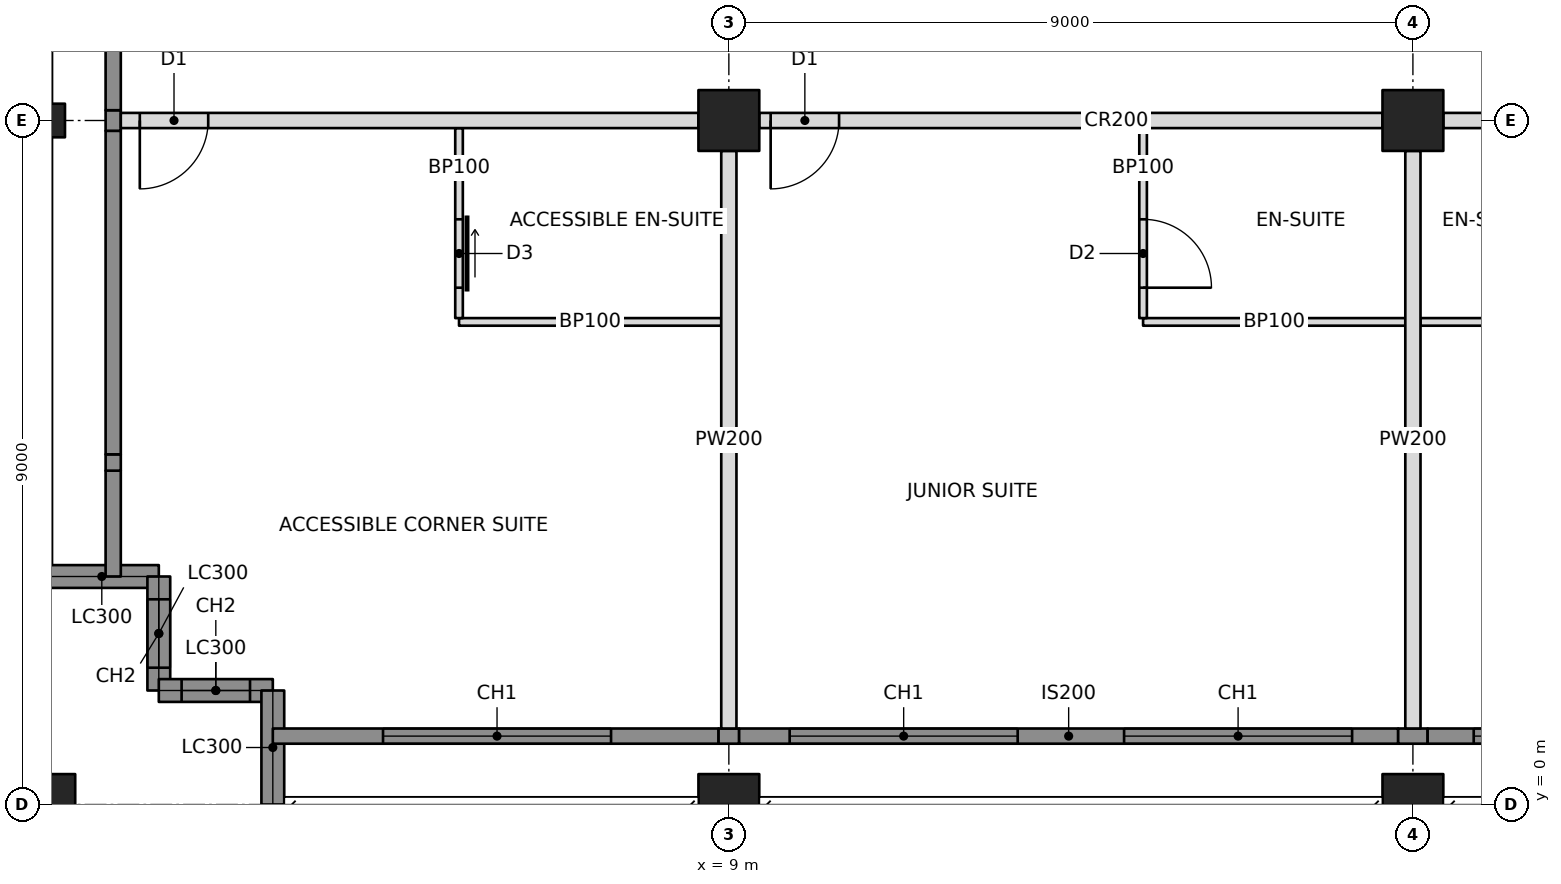
"""IFC4 building model, lengths in metres.
Left out: names, types, materials, properties, quantities, classifications, styles, units other than length and angle.
Written with IfcOpenShell. Run it as: python <this file> out.ifc"""

import sys

from ifc_helpers import new_model, si_unit, direction, frame, frame_2d, origin, origin_with_axes, origin_2d, place, context, subcontext, project, spatial, rectangle, hollow_rectangle, i_section, extrude, element, fill, save


model = new_model("IFC4")
c1 = context("Model", 3, precision=1e-05, world=origin(), true_north=direction((0.0, 1.0)))
c2 = subcontext(c1, "Body", "Model", "MODEL_VIEW")
j1 = project(units=[si_unit("LENGTHUNIT", "METRE"), si_unit("PLANEANGLEUNIT", "RADIAN")], contexts=[c1])
p1 = place(None, origin())
s1 = spatial("IfcSite", under=j1, at=p1, CompositionType="ELEMENT")
p2 = place(p1, origin())
s2 = spatial("IfcBuilding", under=s1, at=p2, CompositionType="ELEMENT")
p3 = place(p2, frame((0.0, 0.0, 148.6)))
s3 = spatial("IfcBuildingStorey", under=s2, at=p3, CompositionType="ELEMENT", Elevation=148.6)
p4 = place(p3, origin_with_axes())
e1 = element("IfcColumn", 1, at=p4, inside=s3, PredefinedType="COLUMN", context=c2, shape_type="SweptSolid", body=[
    extrude(hollow_rectangle(XDim=0.8, YDim=0.8, WallThickness=0.06, at=origin_2d()), origin(), (0.0, 0.0, 1.0), 3.4),
])
p5 = place(p3, frame((0.0, 9.0, 0.0), z_axis=(0.0, 0.0, 1.0), x_axis=(0.0, 1.0, 0.0)))
e2 = element("IfcColumn", 2, at=p5, inside=s3, PredefinedType="COLUMN", context=c2, shape_type="SweptSolid", body=[
    extrude(i_section(OverallWidth=0.442, OverallDepth=0.531, WebThickness=0.066, FlangeThickness=0.106, at=origin_2d()), origin(), (0.0, 0.0, 1.0), 3.4),
])
p6 = place(p3, frame((9.0, 0.0, 0.0), z_axis=(0.0, 0.0, 1.0), x_axis=(1.0, 0.0, 0.0)))
e3 = element("IfcColumn", 3, at=p6, inside=s3, PredefinedType="COLUMN", context=c2, shape_type="SweptSolid", body=[
    extrude(hollow_rectangle(XDim=0.8, YDim=0.8, WallThickness=0.06, at=origin_2d()), origin(), (0.0, 0.0, 1.0), 3.4),
])
p7 = place(p3, frame((9.0, 9.0, 0.0), z_axis=(0.0, 0.0, 1.0), x_axis=(1.0, 0.0, 0.0)))
e4 = element("IfcColumn", 4, at=p7, inside=s3, PredefinedType="COLUMN", context=c2, shape_type="SweptSolid", body=[
    extrude(hollow_rectangle(XDim=0.8, YDim=0.8, WallThickness=0.07, at=origin_2d()), origin(), (0.0, 0.0, 1.0), 3.4),
])
p8 = place(p3, frame((18.0, 0.0, 0.0), z_axis=(0.0, 0.0, 1.0), x_axis=(1.0, 0.0, 0.0)))
e5 = element("IfcColumn", 5, at=p8, inside=s3, PredefinedType="COLUMN", context=c2, shape_type="SweptSolid", body=[
    extrude(hollow_rectangle(XDim=0.8, YDim=0.8, WallThickness=0.06, at=origin_2d()), origin(), (0.0, 0.0, 1.0), 3.4),
])
p9 = place(p3, frame((18.0, 9.0, 0.0), z_axis=(0.0, 0.0, 1.0), x_axis=(1.0, 0.0, 0.0)))
e6 = element("IfcColumn", 6, at=p9, inside=s3, PredefinedType="COLUMN", context=c2, shape_type="SweptSolid", body=[
    extrude(hollow_rectangle(XDim=0.8, YDim=0.8, WallThickness=0.07, at=origin_2d()), origin(), (0.0, 0.0, 1.0), 3.4),
])
p10 = place(p3, frame((0.0, 3.0, 0.0), z_axis=(0.0, 0.0, 1.0), x_axis=(1.0, 0.0, 0.0)))
e7 = element("IfcWall", 7, at=p10, inside=s3, PredefinedType="SOLIDWALL", context=c2, shape_type="SweptSolid", body=[
    extrude(rectangle(XDim=1.5, YDim=0.3, at=frame_2d((0.75, 0.0))), origin(), (0.0, 0.0, 1.0), 2.42),
])
p11 = place(p3, frame((1.5, 3.0, 0.0), z_axis=(0.0, 0.0, 1.0), x_axis=(0.0, -1.0, 0.0)))
e8 = element("IfcWall", 8, at=p11, inside=s3, PredefinedType="SOLIDWALL", context=c2, shape_type="SweptSolid", body=[
    extrude(rectangle(XDim=1.5, YDim=0.3, at=frame_2d((0.75, 0.0))), origin(), (0.0, 0.0, 1.0), 3.2),
])
p12 = place(p11, frame((0.3, 0.0, 0.6)))
e9 = element("IfcOpeningElement", 9, at=p12, cuts=e8, PredefinedType="OPENING", context=c2, shape_type="SweptSolid", body=[
    extrude(rectangle(XDim=0.9, YDim=2.2, at=frame_2d((0.45, 1.1))), frame((0.0, 0.16, 0.0), z_axis=(0.0, -1.0, 0.0), x_axis=(1.0, 0.0, 0.0)), (0.0, 0.0, 1.0), 0.32),
])
p13 = place(p3, frame((1.5, 1.5, 0.0), z_axis=(0.0, 0.0, 1.0), x_axis=(1.0, 0.0, 0.0)))
e10 = element("IfcWall", 10, at=p13, inside=s3, PredefinedType="SOLIDWALL", context=c2, shape_type="SweptSolid", body=[
    extrude(rectangle(XDim=1.5, YDim=0.3, at=frame_2d((0.75, 0.0))), origin(), (0.0, 0.0, 1.0), 3.2),
])
p14 = place(p13, frame((0.3, 0.0, 0.6)))
e11 = element("IfcOpeningElement", 11, at=p14, cuts=e10, PredefinedType="OPENING", context=c2, shape_type="SweptSolid", body=[
    extrude(rectangle(XDim=0.9, YDim=2.2, at=frame_2d((0.45, 1.1))), frame((0.0, 0.16, 0.0), z_axis=(0.0, -1.0, 0.0), x_axis=(1.0, 0.0, 0.0)), (0.0, 0.0, 1.0), 0.32),
])
p15 = place(p3, frame((3.0, 1.5, 0.0), z_axis=(0.0, 0.0, 1.0), x_axis=(0.0, -1.0, 0.0)))
e12 = element("IfcWall", 12, at=p15, inside=s3, PredefinedType="SOLIDWALL", context=c2, shape_type="SweptSolid", body=[
    extrude(rectangle(XDim=1.5, YDim=0.3, at=frame_2d((0.75, 0.0))), origin(), (0.0, 0.0, 1.0), 2.42),
])
p16 = place(p3, frame((3.0, 0.9, 0.0), z_axis=(0.0, 0.0, 1.0), x_axis=(1.0, 0.0, 0.0)))
e13 = element("IfcWall", 13, at=p16, inside=s3, PredefinedType="SOLIDWALL", context=c2, shape_type="SweptSolid", body=[
    extrude(rectangle(XDim=5.865, YDim=0.2, at=frame_2d((2.932, 0.0))), origin(), (0.0, 0.0, 1.0), 3.2),
])
p17 = place(p16, frame((1.45, 0.0, 0.6)))
e14 = element("IfcOpeningElement", 14, at=p17, cuts=e13, PredefinedType="OPENING", context=c2, shape_type="SweptSolid", body=[
    extrude(rectangle(XDim=3.0, YDim=2.2, at=frame_2d((1.5, 1.1))), frame((0.0, 0.11, 0.0), z_axis=(0.0, -1.0, 0.0), x_axis=(1.0, 0.0, 0.0)), (0.0, 0.0, 1.0), 0.22),
])
p18 = place(p3, frame((0.9, 3.0, 0.0), z_axis=(0.0, 0.0, 1.0), x_axis=(0.0, 1.0, 0.0)))
e15 = element("IfcWall", 15, at=p18, inside=s3, PredefinedType="SOLIDWALL", context=c2, shape_type="SweptSolid", body=[
    extrude(rectangle(XDim=1.393, YDim=0.2, at=frame_2d((0.696, 0.0))), origin(), (0.0, 0.0, 1.0), 3.2),
])
p19 = place(p3, frame((1.0, 9.0, 0.0), z_axis=(0.0, 0.0, 1.0), x_axis=(1.0, 0.0, 0.0)))
e16 = element("IfcWall", 16, at=p19, inside=s3, PredefinedType="PARTITIONING", context=c2, shape_type="SweptSolid", body=[
    extrude(rectangle(XDim=7.6, YDim=0.2, at=frame_2d((3.8, 0.0))), origin(), (0.0, 0.0, 1.0), 2.438),
])
p20 = place(p19, frame((0.25, 0.0, 0.0)))
e17 = element("IfcOpeningElement", 17, at=p20, cuts=e16, PredefinedType="OPENING", context=c2, shape_type="SweptSolid", body=[
    extrude(rectangle(XDim=0.9, YDim=2.1, at=frame_2d((0.45, 1.05))), frame((0.0, 0.11, 0.0), z_axis=(0.0, -1.0, 0.0), x_axis=(1.0, 0.0, 0.0)), (0.0, 0.0, 1.0), 0.22),
])
p21 = place(p3, frame((9.4, 9.0, 0.0), z_axis=(0.0, 0.0, 1.0), x_axis=(1.0, 0.0, 0.0)))
e18 = element("IfcWall", 18, at=p21, inside=s3, PredefinedType="PARTITIONING", context=c2, shape_type="SweptSolid", body=[
    extrude(rectangle(XDim=8.2, YDim=0.2, at=frame_2d((4.1, 0.0))), origin(), (0.0, 0.0, 1.0), 2.405),
])
p22 = place(p21, frame((0.15, 0.0, 0.0)))
e19 = element("IfcOpeningElement", 19, at=p22, cuts=e18, PredefinedType="OPENING", context=c2, shape_type="SweptSolid", body=[
    extrude(rectangle(XDim=0.9, YDim=2.1, at=frame_2d((0.45, 1.05))), frame((0.0, 0.11, 0.0), z_axis=(0.0, -1.0, 0.0), x_axis=(1.0, 0.0, 0.0)), (0.0, 0.0, 1.0), 0.22),
])
p23 = place(p3, frame((18.4, 9.0, 0.0), z_axis=(0.0, 0.0, 1.0), x_axis=(1.0, 0.0, 0.0)))
e20 = element("IfcWall", 20, at=p23, inside=s3, PredefinedType="PARTITIONING", context=c2, shape_type="SweptSolid", body=[
    extrude(rectangle(XDim=8.2, YDim=0.2, at=frame_2d((4.1, 0.0))), origin(), (0.0, 0.0, 1.0), 2.405),
])
p24 = place(p23, frame((2.95, 0.0, 0.0)))
e21 = element("IfcOpeningElement", 21, at=p24, cuts=e20, PredefinedType="OPENING", context=c2, shape_type="SweptSolid", body=[
    extrude(rectangle(XDim=0.9, YDim=2.1, at=frame_2d((0.45, 1.05))), frame((0.0, 0.11, 0.0), z_axis=(0.0, -1.0, 0.0), x_axis=(1.0, 0.0, 0.0)), (0.0, 0.0, 1.0), 0.22),
])
p25 = place(p23, frame((4.35, 0.0, 0.0)))
e22 = element("IfcOpeningElement", 22, at=p25, cuts=e20, PredefinedType="OPENING", context=c2, shape_type="SweptSolid", body=[
    extrude(rectangle(XDim=0.9, YDim=2.1, at=frame_2d((0.45, 1.05))), frame((0.0, 0.11, 0.0), z_axis=(0.0, -1.0, 0.0), x_axis=(1.0, 0.0, 0.0)), (0.0, 0.0, 1.0), 0.22),
])
p26 = place(p3, frame((9.0, 8.6, 0.0), z_axis=(0.0, 0.0, 1.0), x_axis=(0.0, -1.0, 0.0)))
e23 = element("IfcWall", 23, at=p26, inside=s3, PredefinedType="PARTITIONING", context=c2, shape_type="SweptSolid", body=[
    extrude(rectangle(XDim=7.6, YDim=0.2, at=frame_2d((3.8, 0.0))), origin(), (0.0, 0.0, 1.0), 2.438),
])
p27 = place(p3, frame((18.0, 8.6, 0.0), z_axis=(0.0, 0.0, 1.0), x_axis=(0.0, -1.0, 0.0)))
e24 = element("IfcWall", 24, at=p27, inside=s3, PredefinedType="PARTITIONING", context=c2, shape_type="SweptSolid", body=[
    extrude(rectangle(XDim=7.6, YDim=0.2, at=frame_2d((3.8, 0.0))), origin(), (0.0, 0.0, 1.0), 2.405),
])
p28 = place(p3, frame((5.45, 6.35, 0.0), z_axis=(0.0, 0.0, 1.0), x_axis=(1.0, 0.0, 0.0)))
e25 = element("IfcWall", 25, at=p28, inside=s3, PredefinedType="PARTITIONING", context=c2, shape_type="SweptSolid", body=[
    extrude(rectangle(XDim=3.45, YDim=0.1, at=frame_2d((1.725, 0.0))), origin(), (0.0, 0.0, 1.0), 2.438),
])
p29 = place(p3, frame((5.45, 8.9, 0.0), z_axis=(0.0, 0.0, 1.0), x_axis=(0.0, -1.0, 0.0)))
e26 = element("IfcWall", 26, at=p29, inside=s3, PredefinedType="PARTITIONING", context=c2, shape_type="SweptSolid", body=[
    extrude(rectangle(XDim=2.5, YDim=0.1, at=frame_2d((1.25, 0.0))), origin(), (0.0, 0.0, 1.0), 2.438),
])
p30 = place(p29, frame((1.2, 0.0, 0.0)))
e27 = element("IfcOpeningElement", 27, at=p30, cuts=e26, PredefinedType="OPENING", context=c2, shape_type="SweptSolid", body=[
    extrude(rectangle(XDim=0.9, YDim=2.1, at=frame_2d((0.45, 1.05))), frame((0.0, 0.06, 0.0), z_axis=(0.0, -1.0, 0.0), x_axis=(1.0, 0.0, 0.0)), (0.0, 0.0, 1.0), 0.12),
])
p31 = place(p3, frame((14.45, 6.35, 0.0), z_axis=(0.0, 0.0, 1.0), x_axis=(1.0, 0.0, 0.0)))
e28 = element("IfcWall", 28, at=p31, inside=s3, PredefinedType="PARTITIONING", context=c2, shape_type="SweptSolid", body=[
    extrude(rectangle(XDim=3.45, YDim=0.1, at=frame_2d((1.725, 0.0))), origin(), (0.0, 0.0, 1.0), 2.404),
])
p32 = place(p3, frame((14.45, 8.9, 0.0), z_axis=(0.0, 0.0, 1.0), x_axis=(0.0, -1.0, 0.0)))
e29 = element("IfcWall", 29, at=p32, inside=s3, PredefinedType="PARTITIONING", context=c2, shape_type="SweptSolid", body=[
    extrude(rectangle(XDim=2.5, YDim=0.1, at=frame_2d((1.25, 0.0))), origin(), (0.0, 0.0, 1.0), 2.404),
])
p33 = place(p32, frame((1.2, 0.0, 0.0)))
e30 = element("IfcOpeningElement", 30, at=p33, cuts=e29, PredefinedType="OPENING", context=c2, shape_type="SweptSolid", body=[
    extrude(rectangle(XDim=0.9, YDim=2.1, at=frame_2d((0.45, 1.05))), frame((0.0, 0.06, 0.0), z_axis=(0.0, -1.0, 0.0), x_axis=(1.0, 0.0, 0.0)), (0.0, 0.0, 1.0), 0.12),
])
p34 = place(p3, frame((18.1, 6.35, 0.0), z_axis=(0.0, 0.0, 1.0), x_axis=(1.0, 0.0, 0.0)))
e31 = element("IfcWall", 31, at=p34, inside=s3, PredefinedType="PARTITIONING", context=c2, shape_type="SweptSolid", body=[
    extrude(rectangle(XDim=2.95, YDim=0.1, at=frame_2d((1.475, 0.0))), origin(), (0.0, 0.0, 1.0), 2.404),
])
p35 = place(p3, frame((8.865, 0.9, 0.0), z_axis=(0.0, 0.0, 1.0), x_axis=(1.0, 0.0, 0.0)))
e32 = element("IfcWall", 32, at=p35, inside=s3, PredefinedType="SOLIDWALL", context=c2, shape_type="SweptSolid", body=[
    extrude(rectangle(XDim=0.271, YDim=0.2, at=frame_2d((0.135, 0.0))), origin(), (0.0, 0.0, 1.0), 2.438),
])
p36 = place(p3, frame((9.135, 0.9, 0.0), z_axis=(0.0, 0.0, 1.0), x_axis=(1.0, 0.0, 0.0)))
e33 = element("IfcWall", 33, at=p36, inside=s3, PredefinedType="SOLIDWALL", context=c2, shape_type="SweptSolid", body=[
    extrude(rectangle(XDim=8.671, YDim=0.2, at=frame_2d((4.335, 0.0))), origin(), (0.0, 0.0, 1.0), 3.2),
])
p37 = place(p36, frame((0.665, 0.0, 0.6)))
e34 = element("IfcOpeningElement", 34, at=p37, cuts=e33, PredefinedType="OPENING", context=c2, shape_type="SweptSolid", body=[
    extrude(rectangle(XDim=3.0, YDim=2.2, at=frame_2d((1.5, 1.1))), frame((0.0, 0.11, 0.0), z_axis=(0.0, -1.0, 0.0), x_axis=(1.0, 0.0, 0.0)), (0.0, 0.0, 1.0), 0.22),
])
p38 = place(p36, frame((5.065, 0.0, 0.6)))
e35 = element("IfcOpeningElement", 35, at=p38, cuts=e33, PredefinedType="OPENING", context=c2, shape_type="SweptSolid", body=[
    extrude(rectangle(XDim=3.0, YDim=2.2, at=frame_2d((1.5, 1.1))), frame((0.0, 0.11, 0.0), z_axis=(0.0, -1.0, 0.0), x_axis=(1.0, 0.0, 0.0)), (0.0, 0.0, 1.0), 0.22),
])
p39 = place(p3, frame((17.806, 0.9, 0.0), z_axis=(0.0, 0.0, 1.0), x_axis=(1.0, 0.0, 0.0)))
e36 = element("IfcWall", 36, at=p39, inside=s3, PredefinedType="SOLIDWALL", context=c2, shape_type="SweptSolid", body=[
    extrude(rectangle(XDim=0.388, YDim=0.2, at=frame_2d((0.194, 0.0))), origin(), (0.0, 0.0, 1.0), 2.404),
])
p40 = place(p3, frame((18.194, 0.9, 0.0), z_axis=(0.0, 0.0, 1.0), x_axis=(1.0, 0.0, 0.0)))
e37 = element("IfcWall", 37, at=p40, inside=s3, PredefinedType="SOLIDWALL", context=c2, shape_type="SweptSolid", body=[
    extrude(rectangle(XDim=8.612, YDim=0.2, at=frame_2d((4.306, 0.0))), origin(), (0.0, 0.0, 1.0), 3.2),
])
p41 = place(p40, frame((0.606, 0.0, 0.6)))
e38 = element("IfcOpeningElement", 38, at=p41, cuts=e37, PredefinedType="OPENING", context=c2, shape_type="SweptSolid", body=[
    extrude(rectangle(XDim=3.0, YDim=2.2, at=frame_2d((1.5, 1.1))), frame((0.0, 0.11, 0.0), z_axis=(0.0, -1.0, 0.0), x_axis=(1.0, 0.0, 0.0)), (0.0, 0.0, 1.0), 0.22),
])
p42 = place(p40, frame((5.006, 0.0, 0.6)))
e39 = element("IfcOpeningElement", 39, at=p42, cuts=e37, PredefinedType="OPENING", context=c2, shape_type="SweptSolid", body=[
    extrude(rectangle(XDim=3.0, YDim=2.2, at=frame_2d((1.5, 1.1))), frame((0.0, 0.11, 0.0), z_axis=(0.0, -1.0, 0.0), x_axis=(1.0, 0.0, 0.0)), (0.0, 0.0, 1.0), 0.22),
])
p43 = place(p3, frame((0.9, 4.393, 0.0), z_axis=(0.0, 0.0, 1.0), x_axis=(0.0, 1.0, 0.0)))
e40 = element("IfcWall", 40, at=p43, inside=s3, PredefinedType="SOLIDWALL", context=c2, shape_type="SweptSolid", body=[
    extrude(rectangle(XDim=0.215, YDim=0.2, at=frame_2d((0.107, 0.0))), origin(), (0.0, 0.0, 1.0), 2.661),
])
p44 = place(p3, frame((0.9, 4.607, 0.0), z_axis=(0.0, 0.0, 1.0), x_axis=(0.0, 1.0, 0.0)))
e41 = element("IfcWall", 41, at=p44, inside=s3, PredefinedType="SOLIDWALL", context=c2, shape_type="SweptSolid", body=[
    extrude(rectangle(XDim=4.257, YDim=0.2, at=frame_2d((2.129, 0.0))), origin(), (0.0, 0.0, 1.0), 3.2),
])
p45 = place(p3, frame((0.9, 8.865, 0.0), z_axis=(0.0, 0.0, 1.0), x_axis=(0.0, 1.0, 0.0)))
e42 = element("IfcWall", 42, at=p45, inside=s3, PredefinedType="SOLIDWALL", context=c2, shape_type="SweptSolid", body=[
    extrude(rectangle(XDim=0.271, YDim=0.2, at=frame_2d((0.135, 0.0))), origin(), (0.0, 0.0, 1.0), 2.438),
])
p46 = place(p3, frame((0.9, 9.135, 0.0), z_axis=(0.0, 0.0, 1.0), x_axis=(0.0, 1.0, 0.0)))
e43 = element("IfcWall", 43, at=p46, inside=s3, PredefinedType="SOLIDWALL", context=c2, shape_type="SweptSolid", body=[
    extrude(rectangle(XDim=8.671, YDim=0.2, at=frame_2d((4.335, 0.0))), origin(), (0.0, 0.0, 1.0), 3.2),
])
p47 = place(p46, frame((2.015, 0.0, 0.6)))
e44 = element("IfcOpeningElement", 44, at=p47, cuts=e43, PredefinedType="OPENING", context=c2, shape_type="SweptSolid", body=[
    extrude(rectangle(XDim=3.0, YDim=2.2, at=frame_2d((1.5, 1.1))), frame((0.0, 0.11, 0.0), z_axis=(0.0, -1.0, 0.0), x_axis=(1.0, 0.0, 0.0)), (0.0, 0.0, 1.0), 0.22),
])
p48 = place(p46, frame((5.515, 0.0, 0.6)))
e45 = element("IfcOpeningElement", 45, at=p48, cuts=e43, PredefinedType="OPENING", context=c2, shape_type="SweptSolid", body=[
    extrude(rectangle(XDim=3.0, YDim=2.2, at=frame_2d((1.5, 1.1))), frame((0.0, 0.11, 0.0), z_axis=(0.0, -1.0, 0.0), x_axis=(1.0, 0.0, 0.0)), (0.0, 0.0, 1.0), 0.22),
])
p49 = place(p12, origin())
e46 = element("IfcWindow", 46, at=p49, inside=s3, PartitioningType="SINGLE_PANEL", PredefinedType="WINDOW", context=c2, shape_type="SweptSolid", body=[
    extrude(rectangle(XDim=0.9, YDim=2.2, at=frame_2d((0.45, 1.1))), frame((0.0, 0.03, 0.0), z_axis=(0.0, -1.0, 0.0), x_axis=(1.0, 0.0, 0.0)), (0.0, 0.0, 1.0), 0.06),
])
fill(e9, e46)
p50 = place(p14, origin())
e47 = element("IfcWindow", 47, at=p50, inside=s3, PartitioningType="SINGLE_PANEL", PredefinedType="WINDOW", context=c2, shape_type="SweptSolid", body=[
    extrude(rectangle(XDim=0.9, YDim=2.2, at=frame_2d((0.45, 1.1))), frame((0.0, 0.03, 0.0), z_axis=(0.0, -1.0, 0.0), x_axis=(1.0, 0.0, 0.0)), (0.0, 0.0, 1.0), 0.06),
])
fill(e11, e47)
p51 = place(p17, origin())
e48 = element("IfcWindow", 48, at=p51, inside=s3, PartitioningType="TRIPLE_PANEL_VERTICAL", PredefinedType="WINDOW", context=c2, shape_type="SweptSolid", body=[
    extrude(rectangle(XDim=3.0, YDim=2.2, at=frame_2d((1.5, 1.1))), frame((0.0, 0.03, 0.0), z_axis=(0.0, -1.0, 0.0), x_axis=(1.0, 0.0, 0.0)), (0.0, 0.0, 1.0), 0.06),
])
fill(e14, e48)
p52 = place(p37, origin())
e49 = element("IfcWindow", 49, at=p52, inside=s3, PartitioningType="TRIPLE_PANEL_VERTICAL", PredefinedType="WINDOW", context=c2, shape_type="SweptSolid", body=[
    extrude(rectangle(XDim=3.0, YDim=2.2, at=frame_2d((1.5, 1.1))), frame((0.0, 0.03, 0.0), z_axis=(0.0, -1.0, 0.0), x_axis=(1.0, 0.0, 0.0)), (0.0, 0.0, 1.0), 0.06),
])
fill(e34, e49)
p53 = place(p38, origin())
e50 = element("IfcWindow", 50, at=p53, inside=s3, PartitioningType="TRIPLE_PANEL_VERTICAL", PredefinedType="WINDOW", context=c2, shape_type="SweptSolid", body=[
    extrude(rectangle(XDim=3.0, YDim=2.2, at=frame_2d((1.5, 1.1))), frame((0.0, 0.03, 0.0), z_axis=(0.0, -1.0, 0.0), x_axis=(1.0, 0.0, 0.0)), (0.0, 0.0, 1.0), 0.06),
])
fill(e35, e50)
p54 = place(p41, origin())
e51 = element("IfcWindow", 51, at=p54, inside=s3, PartitioningType="TRIPLE_PANEL_VERTICAL", PredefinedType="WINDOW", context=c2, shape_type="SweptSolid", body=[
    extrude(rectangle(XDim=3.0, YDim=2.2, at=frame_2d((1.5, 1.1))), frame((0.0, 0.03, 0.0), z_axis=(0.0, -1.0, 0.0), x_axis=(1.0, 0.0, 0.0)), (0.0, 0.0, 1.0), 0.06),
])
fill(e38, e51)
p55 = place(p30, origin())
e52 = element("IfcDoor", 52, at=p55, inside=s3, OperationType="SLIDING_TO_LEFT", PredefinedType="DOOR", context=c2, shape_type="SweptSolid", body=[
    extrude(rectangle(XDim=0.9, YDim=2.1, at=frame_2d((0.45, 1.05))), frame((0.0, 0.025, 0.0), z_axis=(0.0, -1.0, 0.0), x_axis=(1.0, 0.0, 0.0)), (0.0, 0.0, 1.0), 0.05),
])
fill(e27, e52)
p56 = place(p20, frame((0.9, 0.0, 0.0), z_axis=(0.0, 0.0, 1.0), x_axis=(-1.0, 0.0, 0.0)))
e53 = element("IfcDoor", 53, at=p56, inside=s3, OperationType="SINGLE_SWING_RIGHT", PredefinedType="DOOR", context=c2, shape_type="SweptSolid", body=[
    extrude(rectangle(XDim=0.9, YDim=2.1, at=frame_2d((0.45, 1.05))), frame((0.0, 0.025, 0.0), z_axis=(0.0, -1.0, 0.0), x_axis=(1.0, 0.0, 0.0)), (0.0, 0.0, 1.0), 0.05),
])
fill(e17, e53)
p57 = place(p33, origin())
e54 = element("IfcDoor", 54, at=p57, inside=s3, OperationType="SINGLE_SWING_RIGHT", PredefinedType="DOOR", context=c2, shape_type="SweptSolid", body=[
    extrude(rectangle(XDim=0.9, YDim=2.1, at=frame_2d((0.45, 1.05))), frame((0.0, 0.025, 0.0), z_axis=(0.0, -1.0, 0.0), x_axis=(1.0, 0.0, 0.0)), (0.0, 0.0, 1.0), 0.05),
])
fill(e30, e54)
p58 = place(p22, frame((0.9, 0.0, 0.0), z_axis=(0.0, 0.0, 1.0), x_axis=(-1.0, 0.0, 0.0)))
e55 = element("IfcDoor", 55, at=p58, inside=s3, OperationType="SINGLE_SWING_RIGHT", PredefinedType="DOOR", context=c2, shape_type="SweptSolid", body=[
    extrude(rectangle(XDim=0.9, YDim=2.1, at=frame_2d((0.45, 1.05))), frame((0.0, 0.025, 0.0), z_axis=(0.0, -1.0, 0.0), x_axis=(1.0, 0.0, 0.0)), (0.0, 0.0, 1.0), 0.05),
])
fill(e19, e55)
save(model, sys.argv[1])
